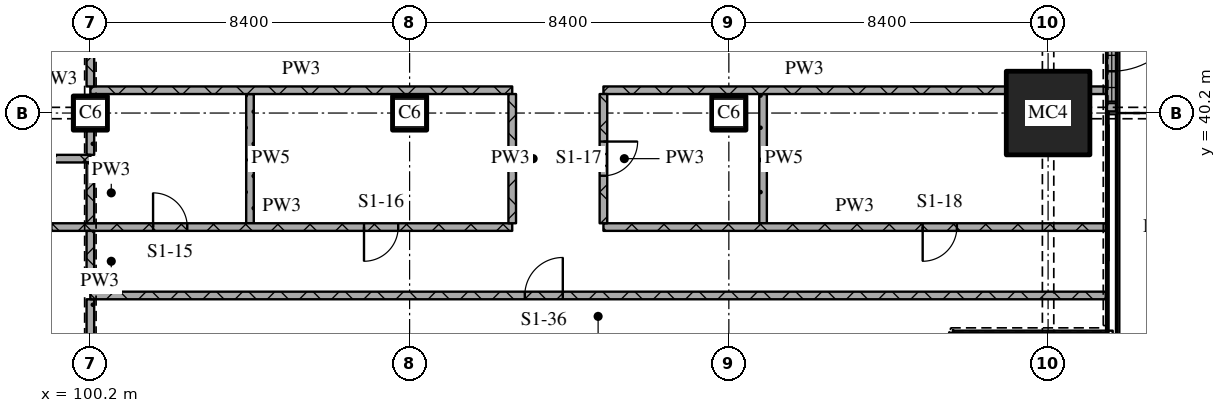
"""IFC4 building model, lengths in metres.
Left out: names, types, materials, properties, quantities, classifications, styles, units other than length and angle.
Written with IfcOpenShell. Run it as: python <this file> out.ifc"""

import sys

from ifc_helpers import new_model, si_unit, direction, frame, frame_2d, origin, origin_2d, place, context, subcontext, project, spatial, rectangle, extrude, element, fill, save


model = new_model("IFC4")
c1 = context("Model", 3, precision=1e-05, world=origin(), true_north=direction((0.0, 1.0)))
c2 = subcontext(c1, "Body", "Model", "MODEL_VIEW")
j1 = project(units=[si_unit("LENGTHUNIT", "METRE"), si_unit("PLANEANGLEUNIT", "RADIAN")], contexts=[c1])
p1 = place(None, origin())
s1 = spatial("IfcSite", under=j1, at=p1, CompositionType="ELEMENT")
p2 = place(p1, origin())
s2 = spatial("IfcBuilding", under=s1, at=p2, CompositionType="ELEMENT")
p3 = place(p2, frame((0.0, 0.0, 19.2)))
s3 = spatial("IfcBuildingStorey", under=s2, at=p3, CompositionType="ELEMENT", Elevation=19.2)
for number, where, z_axis, x_axis in (
    (1, (100.2, 40.2, 0.0), (0.0, 0.0, 1.0), (1.0, 0.0, 0.0)),
    (2, (108.6, 40.2, 0.0), (0.0, 0.0, 1.0), (1.0, 0.0, 0.0)),
    (3, (117.0, 40.2, 0.0), (0.0, 0.0, 1.0), (1.0, 0.0, 0.0)),
):
    element("IfcColumn", number, at=place(p3, frame(where, z_axis=z_axis, x_axis=x_axis)), inside=s3, PredefinedType="COLUMN", context=c2, shape_type="SweptSolid", body=[
        extrude(rectangle(XDim=0.9, YDim=0.9, at=origin_2d()), origin(), (0.0, 0.0, 1.0), 4.5),
    ])
p4 = place(p3, frame((125.4, 40.2, 0.0), z_axis=(0.0, 0.0, 1.0), x_axis=(1.0, 0.0, 0.0)))
e4 = element("IfcColumn", 4, at=p4, inside=s3, PredefinedType="COLUMN", context=c2, shape_type="SweptSolid", body=[
    extrude(rectangle(XDim=2.2, YDim=2.2, at=origin_2d()), origin(), (0.0, 0.0, 1.0), 4.5),
])
p5 = place(p3, frame((127.075, 44.36, 0.0), z_axis=(0.0, 0.0, 1.0), x_axis=(0.0, -1.0, 0.0)))
e5 = element("IfcWall", 5, at=p5, inside=s3, PredefinedType="SOLIDWALL", context=c2, shape_type="SweptSolid", body=[
    extrude(rectangle(XDim=4.12, YDim=0.25, at=frame_2d((2.06, 0.0))), origin(), (0.0, 0.0, 1.0), 4.2),
])
p6 = place(p5, frame((1.06, 0.0, 0.0)))
e6 = element("IfcOpeningElement", 6, at=p6, cuts=e5, PredefinedType="OPENING", context=c2, shape_type="SweptSolid", body=[
    extrude(rectangle(XDim=2.0, YDim=2.4, at=frame_2d((1.0, 1.2))), frame((0.0, 0.135, 0.0), z_axis=(0.0, -1.0, 0.0), x_axis=(1.0, 0.0, 0.0)), (0.0, 0.0, 1.0), 0.27),
])
p7 = place(p5, frame((0.26, 0.0, 2.7)))
e7 = element("IfcOpeningElement", 7, at=p7, cuts=e5, PredefinedType="OPENING", context=c2, shape_type="SweptSolid", body=[
    extrude(rectangle(XDim=3.6, YDim=1.1, at=frame_2d((1.8, 0.55))), frame((0.0, 0.135, 0.0), z_axis=(0.0, -1.0, 0.0), x_axis=(1.0, 0.0, 0.0)), (0.0, 0.0, 1.0), 0.27),
])
p8 = place(p3, frame((126.92, 35.4, 0.0), z_axis=(0.0, 0.0, 1.0), x_axis=(-1.0, 0.0, 0.0)))
e8 = element("IfcWall", 8, at=p8, inside=s3, PredefinedType="PARTITIONING", context=c2, shape_type="SweptSolid", body=[
    extrude(rectangle(XDim=26.72, YDim=0.2, at=frame_2d((13.36, 0.0))), origin(), (0.0, 0.0, 1.0), 4.2),
])
p9 = place(p8, frame((14.289, 0.0, 0.0)))
e9 = element("IfcOpeningElement", 9, at=p9, cuts=e8, PredefinedType="OPENING", context=c2, shape_type="SweptSolid", body=[
    extrude(rectangle(XDim=1.0, YDim=2.1, at=frame_2d((0.5, 1.05))), frame((0.0, 0.11, 0.0), z_axis=(0.0, -1.0, 0.0), x_axis=(1.0, 0.0, 0.0)), (0.0, 0.0, 1.0), 0.22),
])
p10 = place(p3, frame((99.175, 37.2, 0.0), z_axis=(0.0, 0.0, 1.0), x_axis=(1.0, 0.0, 0.0)))
e10 = element("IfcWall", 10, at=p10, inside=s3, PredefinedType="PARTITIONING", context=c2, shape_type="SweptSolid", body=[
    extrude(rectangle(XDim=12.125, YDim=0.2, at=frame_2d((6.062, 0.0))), origin(), (0.0, 0.0, 1.0), 4.2),
])
p11 = place(p10, frame((2.675, 0.0, 0.0)))
e11 = element("IfcOpeningElement", 11, at=p11, cuts=e10, PredefinedType="OPENING", context=c2, shape_type="SweptSolid", body=[
    extrude(rectangle(XDim=0.9, YDim=2.1, at=frame_2d((0.45, 1.05))), frame((0.0, 0.11, 0.0), z_axis=(0.0, -1.0, 0.0), x_axis=(1.0, 0.0, 0.0)), (0.0, 0.0, 1.0), 0.22),
])
p12 = place(p10, frame((8.225, 0.0, 0.0)))
e12 = element("IfcOpeningElement", 12, at=p12, cuts=e10, PredefinedType="OPENING", context=c2, shape_type="SweptSolid", body=[
    extrude(rectangle(XDim=0.9, YDim=2.1, at=frame_2d((0.45, 1.05))), frame((0.0, 0.11, 0.0), z_axis=(0.0, -1.0, 0.0), x_axis=(1.0, 0.0, 0.0)), (0.0, 0.0, 1.0), 0.22),
])
p13 = place(p3, frame((113.7, 37.2, 0.0), z_axis=(0.0, 0.0, 1.0), x_axis=(1.0, 0.0, 0.0)))
e13 = element("IfcWall", 13, at=p13, inside=s3, PredefinedType="PARTITIONING", context=c2, shape_type="SweptSolid", body=[
    extrude(rectangle(XDim=13.22, YDim=0.2, at=frame_2d((6.61, 0.0))), origin(), (0.0, 0.0, 1.0), 4.2),
])
p14 = place(p13, frame((8.4, 0.0, 0.0)))
e14 = element("IfcOpeningElement", 14, at=p14, cuts=e13, PredefinedType="OPENING", context=c2, shape_type="SweptSolid", body=[
    extrude(rectangle(XDim=0.9, YDim=2.1, at=frame_2d((0.45, 1.05))), frame((0.0, 0.11, 0.0), z_axis=(0.0, -1.0, 0.0), x_axis=(1.0, 0.0, 0.0)), (0.0, 0.0, 1.0), 0.22),
])
p15 = place(p3, frame((97.2, 39.0, 0.0), z_axis=(0.0, 0.0, 1.0), x_axis=(1.0, 0.0, 0.0)))
e15 = element("IfcWall", 15, at=p15, inside=s3, PredefinedType="PARTITIONING", context=c2, shape_type="SweptSolid", body=[
    extrude(rectangle(XDim=3.0, YDim=0.2, at=frame_2d((1.5, 0.0))), origin(), (0.0, 0.0, 1.0), 4.2),
])
p16 = place(p3, frame((100.2, 40.8, 0.0), z_axis=(0.0, 0.0, 1.0), x_axis=(1.0, 0.0, 0.0)))
e16 = element("IfcWall", 16, at=p16, inside=s3, PredefinedType="PARTITIONING", context=c2, shape_type="SweptSolid", body=[
    extrude(rectangle(XDim=11.1, YDim=0.2, at=frame_2d((5.55, 0.0))), origin(), (0.0, 0.0, 1.0), 4.2),
])
p17 = place(p3, frame((113.7, 40.8, 0.0), z_axis=(0.0, 0.0, 1.0), x_axis=(1.0, 0.0, 0.0)))
e17 = element("IfcWall", 17, at=p17, inside=s3, PredefinedType="PARTITIONING", context=c2, shape_type="SweptSolid", body=[
    extrude(rectangle(XDim=10.58, YDim=0.2, at=frame_2d((5.29, 0.0))), origin(), (0.0, 0.0, 1.0), 4.2),
])
p18 = place(p3, frame((126.52, 40.8, 0.0), z_axis=(0.0, 0.0, 1.0), x_axis=(1.0, 0.0, 0.0)))
e18 = element("IfcWall", 18, at=p18, inside=s3, PredefinedType="PARTITIONING", context=c2, shape_type="SweptSolid", body=[
    extrude(rectangle(XDim=0.4, YDim=0.2, at=frame_2d((0.2, 0.0))), origin(), (0.0, 0.0, 1.0), 4.2),
])
p19 = place(p3, frame((100.2, 43.1, 0.0), z_axis=(0.0, 0.0, 1.0), x_axis=(0.0, -1.0, 0.0)))
e19 = element("IfcWall", 19, at=p19, inside=s3, PredefinedType="PARTITIONING", context=c2, shape_type="SweptSolid", body=[
    extrude(rectangle(XDim=2.2, YDim=0.2, at=frame_2d((1.1, 0.0))), origin(), (0.0, 0.0, 1.0), 3.3),
])
p20 = place(p3, frame((100.2, 35.3, 0.0), z_axis=(0.0, 0.0, 1.0), x_axis=(0.0, -1.0, 0.0)))
e20 = element("IfcWall", 20, at=p20, inside=s3, PredefinedType="PARTITIONING", context=c2, shape_type="SweptSolid", body=[
    extrude(rectangle(XDim=3.03, YDim=0.2, at=frame_2d((1.515, 0.0))), origin(), (0.0, 0.0, 1.0), 3.7),
])
p21 = place(p3, frame((100.2, 39.73, 0.0), z_axis=(0.0, 0.0, 1.0), x_axis=(0.0, -1.0, 0.0)))
e21 = element("IfcWall", 21, at=p21, inside=s3, PredefinedType="PARTITIONING", context=c2, shape_type="SweptSolid", body=[
    extrude(rectangle(XDim=0.63, YDim=0.2, at=frame_2d((0.315, 0.0))), origin(), (0.0, 0.0, 1.0), 3.7),
])
for number, where, z_axis, x_axis in (
    (22, (104.4, 40.7, 0.0), (0.0, 0.0, 1.0), (0.0, -1.0, 0.0)),
    (23, (111.3, 40.7, 0.0), (0.0, 0.0, 1.0), (0.0, -1.0, 0.0)),
):
    element("IfcWall", number, at=place(p3, frame(where, z_axis=z_axis, x_axis=x_axis)), inside=s3, PredefinedType="PARTITIONING", context=c2, shape_type="SweptSolid", body=[
        extrude(rectangle(XDim=3.4, YDim=0.2, at=frame_2d((1.7, 0.0))), origin(), (0.0, 0.0, 1.0), 4.2),
    ])
p22 = place(p3, frame((113.7, 40.7, 0.0), z_axis=(0.0, 0.0, 1.0), x_axis=(0.0, -1.0, 0.0)))
e24 = element("IfcWall", 24, at=p22, inside=s3, PredefinedType="PARTITIONING", context=c2, shape_type="SweptSolid", body=[
    extrude(rectangle(XDim=3.4, YDim=0.2, at=frame_2d((1.7, 0.0))), origin(), (0.0, 0.0, 1.0), 4.2),
])
p23 = place(p22, frame((1.25, 0.0, 0.0)))
e25 = element("IfcOpeningElement", 25, at=p23, cuts=e24, PredefinedType="OPENING", context=c2, shape_type="SweptSolid", body=[
    extrude(rectangle(XDim=0.9, YDim=2.1, at=frame_2d((0.45, 1.05))), frame((0.0, 0.11, 0.0), z_axis=(0.0, -1.0, 0.0), x_axis=(1.0, 0.0, 0.0)), (0.0, 0.0, 1.0), 0.22),
])
p24 = place(p3, frame((117.9, 40.7, 0.0), z_axis=(0.0, 0.0, 1.0), x_axis=(0.0, -1.0, 0.0)))
e26 = element("IfcWall", 26, at=p24, inside=s3, PredefinedType="PARTITIONING", context=c2, shape_type="SweptSolid", body=[
    extrude(rectangle(XDim=3.4, YDim=0.2, at=frame_2d((1.7, 0.0))), origin(), (0.0, 0.0, 1.0), 4.2),
])
p25 = place(p3, frame((100.2, 37.1, 0.0), z_axis=(0.0, 0.0, 1.0), x_axis=(0.0, -1.0, 0.0)))
e27 = element("IfcWall", 27, at=p25, inside=s3, PredefinedType="PARTITIONING", context=c2, shape_type="SweptSolid", body=[
    extrude(rectangle(XDim=1.6, YDim=0.2, at=frame_2d((0.8, 0.0))), origin(), (0.0, 0.0, 1.0), 3.7),
])
p26 = place(p3, frame((100.2, 38.9, 0.0), z_axis=(0.0, 0.0, 1.0), x_axis=(0.0, -1.0, 0.0)))
e28 = element("IfcWall", 28, at=p26, inside=s3, PredefinedType="PARTITIONING", context=c2, shape_type="SweptSolid", body=[
    extrude(rectangle(XDim=1.6, YDim=0.2, at=frame_2d((0.8, 0.0))), origin(), (0.0, 0.0, 1.0), 3.7),
])
p27 = place(p6, origin())
e29 = element("IfcDoor", 29, at=p27, inside=s3, OperationType="DOUBLE_DOOR_SINGLE_SWING", PredefinedType="DOOR", context=c2, shape_type="SweptSolid", body=[
    extrude(rectangle(XDim=2.0, YDim=2.4, at=frame_2d((1.0, 1.2))), frame((0.0, 0.025, 0.0), z_axis=(0.0, -1.0, 0.0), x_axis=(1.0, 0.0, 0.0)), (0.0, 0.0, 1.0), 0.05),
])
fill(e6, e29)
p28 = place(p7, origin())
e30 = element("IfcWindow", 30, at=p28, inside=s3, PartitioningType="SINGLE_PANEL", PredefinedType="WINDOW", context=c2, shape_type="SweptSolid", body=[
    extrude(rectangle(XDim=3.6, YDim=1.1, at=frame_2d((1.8, 0.55))), frame((0.0, 0.03, 0.0), z_axis=(0.0, -1.0, 0.0), x_axis=(1.0, 0.0, 0.0)), (0.0, 0.0, 1.0), 0.06),
])
fill(e7, e30)
p29 = place(p9, origin())
e31 = element("IfcDoor", 31, at=p29, inside=s3, OperationType="SINGLE_SWING_RIGHT", PredefinedType="DOOR", context=c2, shape_type="SweptSolid", body=[
    extrude(rectangle(XDim=1.0, YDim=2.1, at=frame_2d((0.5, 1.05))), frame((0.0, 0.025, 0.0), z_axis=(0.0, -1.0, 0.0), x_axis=(1.0, 0.0, 0.0)), (0.0, 0.0, 1.0), 0.05),
])
fill(e9, e31)
p30 = place(p11, origin())
e32 = element("IfcDoor", 32, at=p30, inside=s3, OperationType="SINGLE_SWING_LEFT", PredefinedType="DOOR", context=c2, shape_type="SweptSolid", body=[
    extrude(rectangle(XDim=0.9, YDim=2.1, at=frame_2d((0.45, 1.05))), frame((0.0, 0.025, 0.0), z_axis=(0.0, -1.0, 0.0), x_axis=(1.0, 0.0, 0.0)), (0.0, 0.0, 1.0), 0.05),
])
fill(e11, e32)
p31 = place(p12, origin())
e33 = element("IfcDoor", 33, at=p31, inside=s3, OperationType="SINGLE_SWING_RIGHT", PredefinedType="DOOR", context=c2, shape_type="SweptSolid", body=[
    extrude(rectangle(XDim=0.9, YDim=2.1, at=frame_2d((0.45, 1.05))), frame((0.0, 0.025, 0.0), z_axis=(0.0, -1.0, 0.0), x_axis=(1.0, 0.0, 0.0)), (0.0, 0.0, 1.0), 0.05),
])
fill(e12, e33)
p32 = place(p14, origin())
e34 = element("IfcDoor", 34, at=p32, inside=s3, OperationType="SINGLE_SWING_RIGHT", PredefinedType="DOOR", context=c2, shape_type="SweptSolid", body=[
    extrude(rectangle(XDim=0.9, YDim=2.1, at=frame_2d((0.45, 1.05))), frame((0.0, 0.025, 0.0), z_axis=(0.0, -1.0, 0.0), x_axis=(1.0, 0.0, 0.0)), (0.0, 0.0, 1.0), 0.05),
])
fill(e14, e34)
p33 = place(p23, origin())
e35 = element("IfcDoor", 35, at=p33, inside=s3, OperationType="SINGLE_SWING_LEFT", PredefinedType="DOOR", context=c2, shape_type="SweptSolid", body=[
    extrude(rectangle(XDim=0.9, YDim=2.1, at=frame_2d((0.45, 1.05))), frame((0.0, 0.025, 0.0), z_axis=(0.0, -1.0, 0.0), x_axis=(1.0, 0.0, 0.0)), (0.0, 0.0, 1.0), 0.05),
])
fill(e25, e35)
save(model, sys.argv[1])
